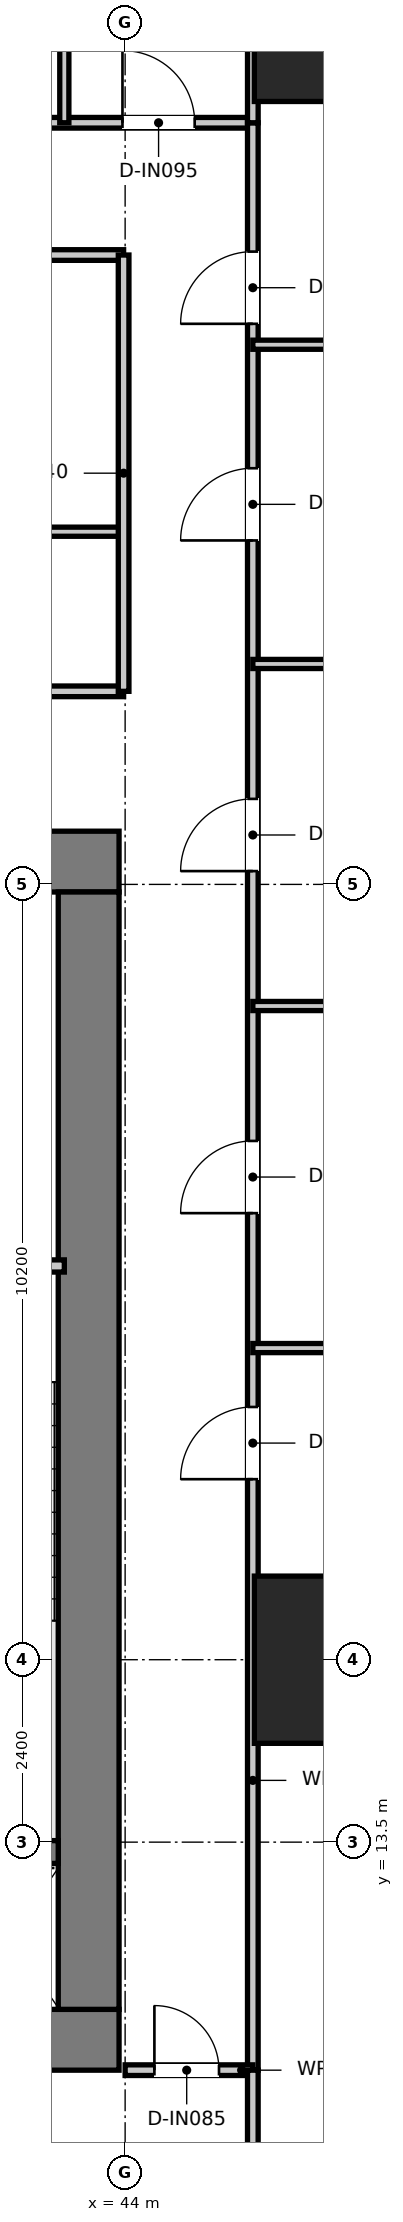
"""IFC4 building model, lengths in metres.
Left out: names, types, materials, properties, quantities, classifications, styles, units other than length and angle.
Written with IfcOpenShell. Run it as: python <this file> out.ifc"""

import sys

from ifc_helpers import new_model, si_unit, direction, frame, frame_2d, origin, origin_2d, place, context, subcontext, project, spatial, rectangle, extrude, source, transform, mapped, element, fill, save


model = new_model("IFC4")
c1 = context("Model", 3, precision=1e-05, world=origin(), true_north=direction((0.0, 1.0)))
c2 = subcontext(c1, "Body", "Model", "MODEL_VIEW")
j1 = project(units=[si_unit("LENGTHUNIT", "METRE"), si_unit("PLANEANGLEUNIT", "RADIAN")], contexts=[c1])
p1 = place(None, origin())
s1 = spatial("IfcSite", under=j1, at=p1, CompositionType="ELEMENT")
p2 = place(p1, origin())
s2 = spatial("IfcBuilding", under=s1, at=p2, CompositionType="ELEMENT")
p3 = place(p2, frame((0.0, 0.0, 72.4)))
s3 = spatial("IfcBuildingStorey", under=s2, at=p3, CompositionType="ELEMENT", Elevation=72.4)
p4 = place(p3, frame((28.08, 10.9, 0.0), z_axis=(0.0, 0.0, 1.0), x_axis=(1.0, 0.0, 0.0)))
e1 = element("IfcWall", 1, at=p4, inside=s3, PredefinedType="SHEAR", context=c2, shape_type="SweptSolid", body=[
    extrude(rectangle(XDim=15.84, YDim=0.8, at=frame_2d((7.92, 0.0))), origin(), (0.0, 0.0, 1.0), 3.95),
])
p5 = place(p3, frame((28.08, 26.4, 0.0), z_axis=(0.0, 0.0, 1.0), x_axis=(1.0, 0.0, 0.0)))
e2 = element("IfcWall", 2, at=p5, inside=s3, PredefinedType="SHEAR", context=c2, shape_type="SweptSolid", body=[
    extrude(rectangle(XDim=15.84, YDim=0.8, at=frame_2d((7.92, 0.0))), origin(), (0.0, 0.0, 1.0), 3.95),
])
p6 = place(p5, frame((7.22, 0.0, 0.0)))
e3 = element("IfcOpeningElement", 3, at=p6, cuts=e2, PredefinedType="OPENING", context=c2, shape_type="SweptSolid", body=[
    extrude(rectangle(XDim=1.4, YDim=2.2, at=frame_2d((0.7, 1.1))), frame((0.0, 0.41, 0.0), z_axis=(0.0, -1.0, 0.0), x_axis=(1.0, 0.0, 0.0)), (0.0, 0.0, 1.0), 0.82),
])
p7 = place(p5, frame((1.775, 0.0, 0.0)))
e4 = element("IfcOpeningElement", 4, at=p7, cuts=e2, PredefinedType="OPENING", context=c2, shape_type="SweptSolid", body=[
    extrude(rectangle(XDim=1.05, YDim=2.1, at=frame_2d((0.525, 1.05))), frame((0.0, 0.41, 0.0), z_axis=(0.0, -1.0, 0.0), x_axis=(1.0, 0.0, 0.0)), (0.0, 0.0, 1.0), 0.82),
])
p8 = place(p5, frame((13.015, 0.0, 0.0)))
e5 = element("IfcOpeningElement", 5, at=p8, cuts=e2, PredefinedType="OPENING", context=c2, shape_type="SweptSolid", body=[
    extrude(rectangle(XDim=1.05, YDim=2.1, at=frame_2d((0.525, 1.05))), frame((0.0, 0.41, 0.0), z_axis=(0.0, -1.0, 0.0), x_axis=(1.0, 0.0, 0.0)), (0.0, 0.0, 1.0), 0.82),
])
p9 = place(p3, frame((43.52, 11.3, 0.0), z_axis=(0.0, 0.0, 1.0), x_axis=(0.0, 1.0, 0.0)))
e6 = element("IfcWall", 6, at=p9, inside=s3, PredefinedType="SHEAR", context=c2, shape_type="SweptSolid", body=[
    extrude(rectangle(XDim=14.7, YDim=0.8, at=frame_2d((7.35, 0.0))), origin(), (0.0, 0.0, 1.0), 3.95),
])
p10 = place(p3, frame((40.02, 13.37, 0.0), z_axis=(0.0, 0.0, 1.0), x_axis=(1.0, 0.0, 0.0)))
e7 = element("IfcWall", 7, at=p10, inside=s3, PredefinedType="SHEAR", context=c2, shape_type="SweptSolid", body=[
    extrude(rectangle(XDim=3.1, YDim=0.3, at=frame_2d((1.55, 0.0))), origin(), (0.0, 0.0, 1.0), 3.95),
])
m1 = source(origin(), c2, "Body", "SweptSolid", [
    extrude(rectangle(XDim=2.2, YDim=2.2, at=origin_2d()), origin(), (0.0, 0.0, 1.0), 3.95),
])
for number, where, z_axis, x_axis in (
    (8, (46.8, 15.9, 0.0), (0.0, 0.0, 1.0), (1.0, 0.0, 0.0)),
    (9, (46.8, 37.5, 0.0), (0.0, 0.0, 1.0), (1.0, 0.0, 0.0)),
):
    element("IfcColumn", number, at=place(p3, frame(where, z_axis=z_axis, x_axis=x_axis)), inside=s3, PredefinedType="USERDEFINED", context=c2, shape_type="MappedRepresentation", body=[
        mapped(m1, transform((0.0, 0.0, 0.0), x_axis=(1.0, 0.0, 0.0), y_axis=(0.0, 1.0, 0.0), z_axis=(0.0, 0.0, 1.0), scale=1.0)),
    ])
p11 = place(p3, frame((40.04, 21.08, 0.0), z_axis=(0.0, 0.0, 1.0), x_axis=(1.0, 0.0, 0.0)))
e10 = element("IfcWall", 10, at=p11, inside=s3, PredefinedType="PARTITIONING", context=c2, shape_type="SweptSolid", body=[
    extrude(rectangle(XDim=3.16, YDim=0.16, at=frame_2d((1.58, 0.0))), origin(), (0.0, 0.0, 1.0), 3.67),
])
p12 = place(p11, frame((1.055, 0.0, 0.0)))
e11 = element("IfcOpeningElement", 11, at=p12, cuts=e10, PredefinedType="OPENING", context=c2, shape_type="SweptSolid", body=[
    extrude(rectangle(XDim=1.05, YDim=2.1, at=frame_2d((0.525, 1.05))), frame((0.0, 0.09, 0.0), z_axis=(0.0, -1.0, 0.0), x_axis=(1.0, 0.0, 0.0)), (0.0, 0.0, 1.0), 0.18),
])
p13 = place(p3, frame((28.02, 28.64, 0.0), z_axis=(0.0, 0.0, 1.0), x_axis=(1.0, 0.0, 0.0)))
e12 = element("IfcWall", 12, at=p13, inside=s3, PredefinedType="PARTITIONING", context=c2, shape_type="SweptSolid", body=[
    extrude(rectangle(XDim=15.96, YDim=0.14, at=frame_2d((7.98, 0.0))), origin(), (0.0, 0.0, 1.0), 3.08),
])
p14 = place(p13, frame((7.455, 0.0, 0.0)))
e13 = element("IfcOpeningElement", 13, at=p14, cuts=e12, PredefinedType="OPENING", context=c2, shape_type="SweptSolid", body=[
    extrude(rectangle(XDim=1.05, YDim=2.15, at=frame_2d((0.525, 1.075))), frame((0.0, 0.08, 0.0), z_axis=(0.0, -1.0, 0.0), x_axis=(1.0, 0.0, 0.0)), (0.0, 0.0, 1.0), 0.16),
])
p15 = place(p3, frame((28.02, 30.74, 0.0), z_axis=(0.0, 0.0, 1.0), x_axis=(1.0, 0.0, 0.0)))
e14 = element("IfcWall", 14, at=p15, inside=s3, PredefinedType="PARTITIONING", context=c2, shape_type="SweptSolid", body=[
    extrude(rectangle(XDim=15.96, YDim=0.12, at=frame_2d((7.98, 0.0))), origin(), (0.0, 0.0, 1.0), 3.08),
])
p16 = place(p3, frame((28.02, 34.38, 0.0), z_axis=(0.0, 0.0, 1.0), x_axis=(1.0, 0.0, 0.0)))
e15 = element("IfcWall", 15, at=p16, inside=s3, PredefinedType="PARTITIONING", context=c2, shape_type="SweptSolid", body=[
    extrude(rectangle(XDim=15.96, YDim=0.14, at=frame_2d((7.98, 0.0))), origin(), (0.0, 0.0, 1.0), 3.08),
])
p17 = place(p16, frame((1.13, 0.0, 0.0)))
e16 = element("IfcOpeningElement", 16, at=p17, cuts=e15, PredefinedType="OPENING", context=c2, shape_type="SweptSolid", body=[
    extrude(rectangle(XDim=0.9, YDim=2.1, at=frame_2d((0.45, 1.05))), frame((0.0, 0.08, 0.0), z_axis=(0.0, -1.0, 0.0), x_axis=(1.0, 0.0, 0.0)), (0.0, 0.0, 1.0), 0.16),
])
p18 = place(p16, frame((4.33, 0.0, 0.0)))
e17 = element("IfcOpeningElement", 17, at=p18, cuts=e15, PredefinedType="OPENING", context=c2, shape_type="SweptSolid", body=[
    extrude(rectangle(XDim=0.9, YDim=2.1, at=frame_2d((0.45, 1.05))), frame((0.0, 0.08, 0.0), z_axis=(0.0, -1.0, 0.0), x_axis=(1.0, 0.0, 0.0)), (0.0, 0.0, 1.0), 0.16),
])
p19 = place(p16, frame((7.355, 0.0, 0.0)))
e18 = element("IfcOpeningElement", 18, at=p19, cuts=e15, PredefinedType="OPENING", context=c2, shape_type="SweptSolid", body=[
    extrude(rectangle(XDim=0.95, YDim=2.1, at=frame_2d((0.475, 1.05))), frame((0.0, 0.08, 0.0), z_axis=(0.0, -1.0, 0.0), x_axis=(1.0, 0.0, 0.0)), (0.0, 0.0, 1.0), 0.16),
])
p20 = place(p16, frame((12.23, 0.0, 0.0)))
e19 = element("IfcOpeningElement", 19, at=p20, cuts=e15, PredefinedType="OPENING", context=c2, shape_type="SweptSolid", body=[
    extrude(rectangle(XDim=0.95, YDim=2.1, at=frame_2d((0.475, 1.05))), frame((0.0, 0.08, 0.0), z_axis=(0.0, -1.0, 0.0), x_axis=(1.0, 0.0, 0.0)), (0.0, 0.0, 1.0), 0.16),
])
p21 = place(p3, frame((43.98, 28.64, 0.0), z_axis=(0.0, 0.0, 1.0), x_axis=(0.0, 1.0, 0.0)))
e20 = element("IfcWall", 20, at=p21, inside=s3, PredefinedType="PARTITIONING", context=c2, shape_type="SweptSolid", body=[
    extrude(rectangle(XDim=5.74, YDim=0.14, at=frame_2d((2.87, 0.0))), origin(), (0.0, 0.0, 1.0), 3.22),
])
p22 = place(p3, frame((26.32, 36.12, 0.0), z_axis=(0.0, 0.0, 1.0), x_axis=(1.0, 0.0, 0.0)))
e21 = element("IfcWall", 21, at=p22, inside=s3, PredefinedType="PARTITIONING", context=c2, shape_type="SweptSolid", body=[
    extrude(rectangle(XDim=19.36, YDim=0.14, at=frame_2d((9.68, 0.0))), origin(), (0.0, 0.0, 1.0), 3.08),
])
p23 = place(p22, frame((1.265, 0.0, 0.0)))
e22 = element("IfcOpeningElement", 22, at=p23, cuts=e21, PredefinedType="OPENING", context=c2, shape_type="SweptSolid", body=[
    extrude(rectangle(XDim=0.95, YDim=2.1, at=frame_2d((0.475, 1.05))), frame((0.0, 0.08, 0.0), z_axis=(0.0, -1.0, 0.0), x_axis=(1.0, 0.0, 0.0)), (0.0, 0.0, 1.0), 0.16),
])
p24 = place(p22, frame((5.305, 0.0, 0.0)))
e23 = element("IfcOpeningElement", 23, at=p24, cuts=e21, PredefinedType="OPENING", context=c2, shape_type="SweptSolid", body=[
    extrude(rectangle(XDim=0.95, YDim=2.1, at=frame_2d((0.475, 1.05))), frame((0.0, 0.08, 0.0), z_axis=(0.0, -1.0, 0.0), x_axis=(1.0, 0.0, 0.0)), (0.0, 0.0, 1.0), 0.16),
])
p25 = place(p22, frame((9.905, 0.0, 0.0)))
e24 = element("IfcOpeningElement", 24, at=p25, cuts=e21, PredefinedType="OPENING", context=c2, shape_type="SweptSolid", body=[
    extrude(rectangle(XDim=0.95, YDim=2.1, at=frame_2d((0.475, 1.05))), frame((0.0, 0.08, 0.0), z_axis=(0.0, -1.0, 0.0), x_axis=(1.0, 0.0, 0.0)), (0.0, 0.0, 1.0), 0.16),
])
p26 = place(p22, frame((14.305, 0.0, 0.0)))
e25 = element("IfcOpeningElement", 25, at=p26, cuts=e21, PredefinedType="OPENING", context=c2, shape_type="SweptSolid", body=[
    extrude(rectangle(XDim=0.95, YDim=2.1, at=frame_2d((0.475, 1.05))), frame((0.0, 0.08, 0.0), z_axis=(0.0, -1.0, 0.0), x_axis=(1.0, 0.0, 0.0)), (0.0, 0.0, 1.0), 0.16),
])
p27 = place(p22, frame((17.645, 0.0, 0.0)))
e26 = element("IfcOpeningElement", 26, at=p27, cuts=e21, PredefinedType="OPENING", context=c2, shape_type="SweptSolid", body=[
    extrude(rectangle(XDim=0.95, YDim=2.1, at=frame_2d((0.475, 1.05))), frame((0.0, 0.08, 0.0), z_axis=(0.0, -1.0, 0.0), x_axis=(1.0, 0.0, 0.0)), (0.0, 0.0, 1.0), 0.16),
])
p28 = place(p3, frame((45.68, 10.5, 0.0), z_axis=(0.0, 0.0, 1.0), x_axis=(0.0, 1.0, 0.0)))
e27 = element("IfcWall", 27, at=p28, inside=s3, PredefinedType="PARTITIONING", context=c2, shape_type="SweptSolid", body=[
    extrude(rectangle(XDim=25.62, YDim=0.14, at=frame_2d((12.81, 0.0))), origin(), (0.0, 0.0, 1.0), 2.97),
])
p29 = place(p28, frame((7.775, 0.0, 0.0)))
e28 = element("IfcOpeningElement", 28, at=p29, cuts=e27, PredefinedType="OPENING", context=c2, shape_type="SweptSolid", body=[
    extrude(rectangle(XDim=0.95, YDim=2.1, at=frame_2d((0.475, 1.05))), frame((0.0, 0.08, 0.0), z_axis=(0.0, -1.0, 0.0), x_axis=(1.0, 0.0, 0.0)), (0.0, 0.0, 1.0), 0.16),
])
p30 = place(p28, frame((11.275, 0.0, 0.0)))
e29 = element("IfcOpeningElement", 29, at=p30, cuts=e27, PredefinedType="OPENING", context=c2, shape_type="SweptSolid", body=[
    extrude(rectangle(XDim=0.95, YDim=2.1, at=frame_2d((0.475, 1.05))), frame((0.0, 0.08, 0.0), z_axis=(0.0, -1.0, 0.0), x_axis=(1.0, 0.0, 0.0)), (0.0, 0.0, 1.0), 0.16),
])
p31 = place(p28, frame((15.775, 0.0, 0.0)))
e30 = element("IfcOpeningElement", 30, at=p31, cuts=e27, PredefinedType="OPENING", context=c2, shape_type="SweptSolid", body=[
    extrude(rectangle(XDim=0.95, YDim=2.1, at=frame_2d((0.475, 1.05))), frame((0.0, 0.08, 0.0), z_axis=(0.0, -1.0, 0.0), x_axis=(1.0, 0.0, 0.0)), (0.0, 0.0, 1.0), 0.16),
])
p32 = place(p28, frame((20.125, 0.0, 0.0)))
e31 = element("IfcOpeningElement", 31, at=p32, cuts=e27, PredefinedType="OPENING", context=c2, shape_type="SweptSolid", body=[
    extrude(rectangle(XDim=0.95, YDim=2.1, at=frame_2d((0.475, 1.05))), frame((0.0, 0.08, 0.0), z_axis=(0.0, -1.0, 0.0), x_axis=(1.0, 0.0, 0.0)), (0.0, 0.0, 1.0), 0.16),
])
p33 = place(p28, frame((22.975, 0.0, 0.0)))
e32 = element("IfcOpeningElement", 32, at=p33, cuts=e27, PredefinedType="OPENING", context=c2, shape_type="SweptSolid", body=[
    extrude(rectangle(XDim=0.95, YDim=2.1, at=frame_2d((0.475, 1.05))), frame((0.0, 0.08, 0.0), z_axis=(0.0, -1.0, 0.0), x_axis=(1.0, 0.0, 0.0)), (0.0, 0.0, 1.0), 0.16),
])
p34 = place(p3, frame((44.0, 10.5, 0.0), z_axis=(0.0, 0.0, 1.0), x_axis=(1.0, 0.0, 0.0)))
e33 = element("IfcWall", 33, at=p34, inside=s3, PredefinedType="PARTITIONING", context=c2, shape_type="SweptSolid", body=[
    extrude(rectangle(XDim=1.68, YDim=0.14, at=frame_2d((0.84, 0.0))), origin(), (0.0, 0.0, 1.0), 3.67),
])
p35 = place(p34, frame((0.385, 0.0, 0.0)))
e34 = element("IfcOpeningElement", 34, at=p35, cuts=e33, PredefinedType="OPENING", context=c2, shape_type="SweptSolid", body=[
    extrude(rectangle(XDim=0.85, YDim=2.1, at=frame_2d((0.425, 1.05))), frame((0.0, 0.08, 0.0), z_axis=(0.0, -1.0, 0.0), x_axis=(1.0, 0.0, 0.0)), (0.0, 0.0, 1.0), 0.16),
])
p36 = place(p3, frame((45.68, 36.12, 0.0), z_axis=(0.0, 0.0, 1.0), x_axis=(0.0, 1.0, 0.0)))
e35 = element("IfcWall", 35, at=p36, inside=s3, PredefinedType="PARTITIONING", context=c2, shape_type="SweptSolid", body=[
    extrude(rectangle(XDim=14.32, YDim=0.14, at=frame_2d((7.16, 0.0))), origin(), (0.0, 0.0, 1.0), 2.97),
])
p37 = place(p3, frame((45.68, 0.067, 0.0), z_axis=(0.0, 0.0, 1.0), x_axis=(0.0, 1.0, 0.0)))
e36 = element("IfcWall", 36, at=p37, inside=s3, PredefinedType="PARTITIONING", context=c2, shape_type="SweptSolid", body=[
    extrude(rectangle(XDim=10.433, YDim=0.14, at=frame_2d((5.217, 0.0))), origin(), (0.0, 0.0, 1.0), 3.67),
])
p38 = place(p3, frame((43.2, 36.12, 0.0), z_axis=(0.0, 0.0, 1.0), x_axis=(0.0, 1.0, 0.0)))
e37 = element("IfcWall", 37, at=p38, inside=s3, PredefinedType="PARTITIONING", context=c2, shape_type="SweptSolid", body=[
    extrude(rectangle(XDim=14.69, YDim=0.12, at=frame_2d((7.345, 0.0))), origin(), (0.0, 0.0, 1.0), 2.97),
])
p39 = place(p3, frame((45.68, 20.0, 0.0), z_axis=(0.0, 0.0, 1.0), x_axis=(1.0, 0.0, 0.0)))
e38 = element("IfcWall", 38, at=p39, inside=s3, PredefinedType="PARTITIONING", context=c2, shape_type="SweptSolid", body=[
    extrude(rectangle(XDim=14.505, YDim=0.12, at=frame_2d((7.253, 0.0))), origin(), (0.0, 0.0, 1.0), 2.97),
])
p40 = place(p3, frame((45.68, 24.5, 0.0), z_axis=(0.0, 0.0, 1.0), x_axis=(1.0, 0.0, 0.0)))
e39 = element("IfcWall", 39, at=p40, inside=s3, PredefinedType="PARTITIONING", context=c2, shape_type="SweptSolid", body=[
    extrude(rectangle(XDim=15.178, YDim=0.12, at=frame_2d((7.589, 0.0))), origin(), (0.0, 0.0, 1.0), 2.97),
])
p41 = place(p3, frame((45.68, 29.0, 0.0), z_axis=(0.0, 0.0, 1.0), x_axis=(1.0, 0.0, 0.0)))
e40 = element("IfcWall", 40, at=p41, inside=s3, PredefinedType="PARTITIONING", context=c2, shape_type="SweptSolid", body=[
    extrude(rectangle(XDim=15.851, YDim=0.12, at=frame_2d((7.925, 0.0))), origin(), (0.0, 0.0, 1.0), 2.97),
])
p42 = place(p3, frame((45.68, 33.2, 0.0), z_axis=(0.0, 0.0, 1.0), x_axis=(1.0, 0.0, 0.0)))
e41 = element("IfcWall", 41, at=p42, inside=s3, PredefinedType="PARTITIONING", context=c2, shape_type="SweptSolid", body=[
    extrude(rectangle(XDim=16.478, YDim=0.12, at=frame_2d((8.239, 0.0))), origin(), (0.0, 0.0, 1.0), 2.97),
])
p43 = place(p27, origin())
e42 = element("IfcDoor", 42, at=p43, inside=s3, OperationType="SINGLE_SWING_LEFT", PredefinedType="DOOR", context=c2, shape_type="SweptSolid", body=[
    extrude(rectangle(XDim=0.95, YDim=2.1, at=frame_2d((0.475, 1.05))), frame((0.0, 0.025, 0.0), z_axis=(0.0, -1.0, 0.0), x_axis=(1.0, 0.0, 0.0)), (0.0, 0.0, 1.0), 0.05),
])
fill(e26, e42)
p44 = place(p29, origin())
e43 = element("IfcDoor", 43, at=p44, inside=s3, OperationType="SINGLE_SWING_LEFT", PredefinedType="DOOR", context=c2, shape_type="SweptSolid", body=[
    extrude(rectangle(XDim=0.95, YDim=2.1, at=frame_2d((0.475, 1.05))), frame((0.0, 0.025, 0.0), z_axis=(0.0, -1.0, 0.0), x_axis=(1.0, 0.0, 0.0)), (0.0, 0.0, 1.0), 0.05),
])
fill(e28, e43)
p45 = place(p30, origin())
e44 = element("IfcDoor", 44, at=p45, inside=s3, OperationType="SINGLE_SWING_LEFT", PredefinedType="DOOR", context=c2, shape_type="SweptSolid", body=[
    extrude(rectangle(XDim=0.95, YDim=2.1, at=frame_2d((0.475, 1.05))), frame((0.0, 0.025, 0.0), z_axis=(0.0, -1.0, 0.0), x_axis=(1.0, 0.0, 0.0)), (0.0, 0.0, 1.0), 0.05),
])
fill(e29, e44)
p46 = place(p31, origin())
e45 = element("IfcDoor", 45, at=p46, inside=s3, OperationType="SINGLE_SWING_LEFT", PredefinedType="DOOR", context=c2, shape_type="SweptSolid", body=[
    extrude(rectangle(XDim=0.95, YDim=2.1, at=frame_2d((0.475, 1.05))), frame((0.0, 0.025, 0.0), z_axis=(0.0, -1.0, 0.0), x_axis=(1.0, 0.0, 0.0)), (0.0, 0.0, 1.0), 0.05),
])
fill(e30, e45)
p47 = place(p32, origin())
e46 = element("IfcDoor", 46, at=p47, inside=s3, OperationType="SINGLE_SWING_LEFT", PredefinedType="DOOR", context=c2, shape_type="SweptSolid", body=[
    extrude(rectangle(XDim=0.95, YDim=2.1, at=frame_2d((0.475, 1.05))), frame((0.0, 0.025, 0.0), z_axis=(0.0, -1.0, 0.0), x_axis=(1.0, 0.0, 0.0)), (0.0, 0.0, 1.0), 0.05),
])
fill(e31, e46)
p48 = place(p33, origin())
e47 = element("IfcDoor", 47, at=p48, inside=s3, OperationType="SINGLE_SWING_LEFT", PredefinedType="DOOR", context=c2, shape_type="SweptSolid", body=[
    extrude(rectangle(XDim=0.95, YDim=2.1, at=frame_2d((0.475, 1.05))), frame((0.0, 0.025, 0.0), z_axis=(0.0, -1.0, 0.0), x_axis=(1.0, 0.0, 0.0)), (0.0, 0.0, 1.0), 0.05),
])
fill(e32, e47)
p49 = place(p35, origin())
e48 = element("IfcDoor", 48, at=p49, inside=s3, OperationType="SINGLE_SWING_LEFT", PredefinedType="DOOR", context=c2, shape_type="SweptSolid", body=[
    extrude(rectangle(XDim=0.85, YDim=2.1, at=frame_2d((0.425, 1.05))), frame((0.0, 0.025, 0.0), z_axis=(0.0, -1.0, 0.0), x_axis=(1.0, 0.0, 0.0)), (0.0, 0.0, 1.0), 0.05),
])
fill(e34, e48)
save(model, sys.argv[1])
